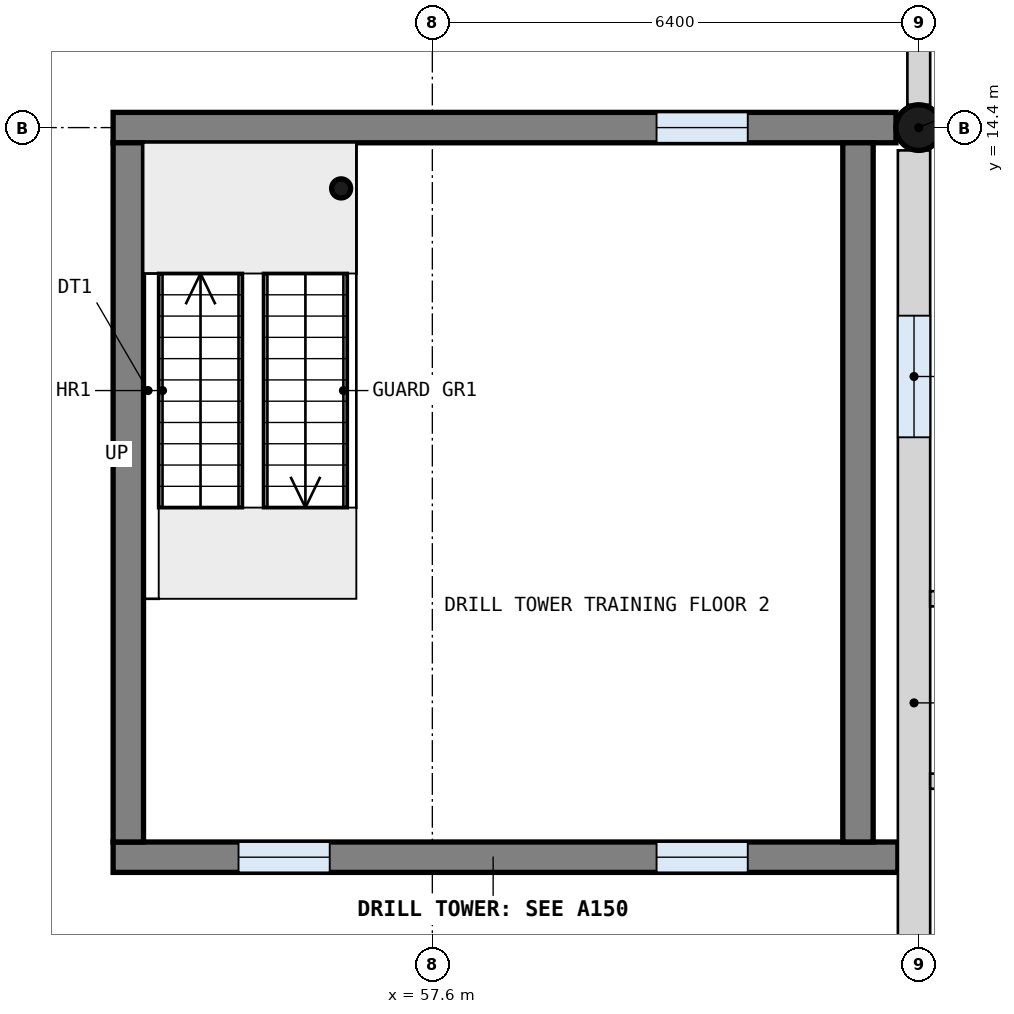
"""IFC4 building model, lengths in metres.
Left out: names, types, materials, properties, quantities, classifications, styles, units other than length and angle.
Written with IfcOpenShell. Run it as: python <this file> out.ifc"""

import sys

from ifc_helpers import new_model, si_unit, direction, frame, frame_2d, origin, origin_2d, place, context, subcontext, project, spatial, rectangle, circle, extrude, element, fill, save


model = new_model("IFC4")
c1 = context("Model", 3, precision=1e-05, world=origin(), true_north=direction((0.0, 1.0)))
c2 = subcontext(c1, "Body", "Model", "MODEL_VIEW")
j1 = project(units=[si_unit("LENGTHUNIT", "METRE"), si_unit("PLANEANGLEUNIT", "RADIAN")], contexts=[c1])
p1 = place(None, origin())
s1 = spatial("IfcSite", under=j1, at=p1, CompositionType="ELEMENT")
p2 = place(p1, origin())
s2 = spatial("IfcBuilding", under=s1, at=p2, CompositionType="ELEMENT")
p3 = place(p2, frame((0.0, 0.0, 4.2)))
s3 = spatial("IfcBuildingStorey", under=s2, at=p3, CompositionType="ELEMENT", Elevation=4.2)
p4 = place(p3, frame((64.0, 14.4, 0.0), z_axis=(0.0, 0.0, 1.0), x_axis=(1.0, 0.0, 0.0)))
e1 = element("IfcColumn", 1, at=p4, inside=s3, PredefinedType="COLUMN", context=c2, shape_type="SweptSolid", body=[
    extrude(circle(Radius=0.3, at=origin_2d()), origin(), (0.0, 0.0, 1.0), 4.2),
])
p5 = place(p3, frame((53.4, 14.4, 0.0), z_axis=(0.0, 0.0, 1.0), x_axis=(1.0, 0.0, 0.0)))
e2 = element("IfcWall", 2, at=p5, inside=s3, PredefinedType="SHEAR", context=c2, shape_type="SweptSolid", body=[
    extrude(rectangle(XDim=10.3, YDim=0.4, at=frame_2d((5.15, 0.0))), origin(), (0.0, 0.0, 1.0), 4.2),
])
p6 = place(p5, frame((7.15, 0.0, 1.1)))
e3 = element("IfcOpeningElement", 3, at=p6, cuts=e2, PredefinedType="OPENING", context=c2, shape_type="SweptSolid", body=[
    extrude(rectangle(XDim=1.2, YDim=1.5, at=frame_2d((0.6, 0.75))), frame((0.0, 0.21, 0.0), z_axis=(0.0, -1.0, 0.0), x_axis=(1.0, 0.0, 0.0)), (0.0, 0.0, 1.0), 0.42),
])
p7 = place(p3, frame((53.4, 4.8, 0.0), z_axis=(0.0, 0.0, 1.0), x_axis=(1.0, 0.0, 0.0)))
e4 = element("IfcWall", 4, at=p7, inside=s3, PredefinedType="SHEAR", context=c2, shape_type="SweptSolid", body=[
    extrude(rectangle(XDim=10.325, YDim=0.4, at=frame_2d((5.163, 0.0))), origin(), (0.0, 0.0, 1.0), 4.2),
])
p8 = place(p7, frame((1.65, 0.0, 1.1)))
e5 = element("IfcOpeningElement", 5, at=p8, cuts=e4, PredefinedType="OPENING", context=c2, shape_type="SweptSolid", body=[
    extrude(rectangle(XDim=1.2, YDim=1.5, at=frame_2d((0.6, 0.75))), frame((0.0, 0.21, 0.0), z_axis=(0.0, -1.0, 0.0), x_axis=(1.0, 0.0, 0.0)), (0.0, 0.0, 1.0), 0.42),
])
p9 = place(p7, frame((7.15, 0.0, 1.1)))
e6 = element("IfcOpeningElement", 6, at=p9, cuts=e4, PredefinedType="OPENING", context=c2, shape_type="SweptSolid", body=[
    extrude(rectangle(XDim=1.2, YDim=1.5, at=frame_2d((0.6, 0.75))), frame((0.0, 0.21, 0.0), z_axis=(0.0, -1.0, 0.0), x_axis=(1.0, 0.0, 0.0)), (0.0, 0.0, 1.0), 0.42),
])
for number, where, z_axis, x_axis in (
    (7, (63.2, 5.0, 0.0), (0.0, 0.0, 1.0), (0.0, 1.0, 0.0)),
    (8, (53.6, 5.0, 0.0), (0.0, 0.0, 1.0), (0.0, 1.0, 0.0)),
):
    element("IfcWall", number, at=place(p3, frame(where, z_axis=z_axis, x_axis=x_axis)), inside=s3, PredefinedType="SHEAR", context=c2, shape_type="SweptSolid", body=[
        extrude(rectangle(XDim=9.2, YDim=0.4, at=frame_2d((4.6, 0.0))), origin(), (0.0, 0.0, 1.0), 4.2),
    ])
p10 = place(p3, frame((63.938, 0.3, 0.0), z_axis=(0.0, 0.0, 1.0), x_axis=(0.0, 1.0, 0.0)))
e9 = element("IfcWall", 9, at=p10, inside=s3, PredefinedType="SOLIDWALL", context=c2, shape_type="SweptSolid", body=[
    extrude(rectangle(XDim=13.8, YDim=0.425, at=frame_2d((6.9, 0.0))), origin(), (0.0, 0.0, 1.0), 2.9),
])
p11 = place(p10, frame((1.425, 0.0, 1.0)))
e10 = element("IfcOpeningElement", 10, at=p11, cuts=e9, PredefinedType="OPENING", context=c2, shape_type="SweptSolid", body=[
    extrude(rectangle(XDim=1.6, YDim=1.8, at=frame_2d((0.8, 0.9))), frame((0.0, 0.222, 0.0), z_axis=(0.0, -1.0, 0.0), x_axis=(1.0, 0.0, 0.0)), (0.0, 0.0, 1.0), 0.445),
])
p12 = place(p10, frame((10.025, 0.0, 1.0)))
e11 = element("IfcOpeningElement", 11, at=p12, cuts=e9, PredefinedType="OPENING", context=c2, shape_type="SweptSolid", body=[
    extrude(rectangle(XDim=1.6, YDim=1.8, at=frame_2d((0.8, 0.9))), frame((0.0, 0.222, 0.0), z_axis=(0.0, -1.0, 0.0), x_axis=(1.0, 0.0, 0.0)), (0.0, 0.0, 1.0), 0.445),
])
p13 = place(p3, frame((64.0, 14.7, 0.0), z_axis=(0.0, 0.0, 1.0), x_axis=(0.0, 1.0, 0.0)))
e12 = element("IfcWall", 12, at=p13, inside=s3, PredefinedType="SOLIDWALL", context=c2, shape_type="SweptSolid", body=[
    extrude(rectangle(XDim=4.5, YDim=0.3, at=frame_2d((2.25, 0.0))), origin(), (0.0, 0.0, 1.0), 2.9),
])
p14 = place(p13, frame((1.45, 0.0, 1.0)))
e13 = element("IfcOpeningElement", 13, at=p14, cuts=e12, PredefinedType="OPENING", context=c2, shape_type="SweptSolid", body=[
    extrude(rectangle(XDim=1.6, YDim=1.8, at=frame_2d((0.8, 0.9))), frame((0.0, 0.16, 0.0), z_axis=(0.0, -1.0, 0.0), x_axis=(1.0, 0.0, 0.0)), (0.0, 0.0, 1.0), 0.32),
])
p15 = place(p3, frame((67.2, 5.8, 0.0), z_axis=(0.0, 0.0, 1.0), x_axis=(-1.0, 0.0, 0.0)))
e14 = element("IfcWall", 14, at=p15, inside=s3, PredefinedType="PARTITIONING", context=c2, shape_type="SweptSolid", body=[
    extrude(rectangle(XDim=3.05, YDim=0.2, at=frame_2d((1.525, 0.0))), origin(), (0.0, 0.0, 1.0), 3.9),
])
p16 = place(p15, frame((1.1, 0.0, 0.0)))
e15 = element("IfcOpeningElement", 15, at=p16, cuts=e14, PredefinedType="OPENING", context=c2, shape_type="SweptSolid", body=[
    extrude(rectangle(XDim=1.0, YDim=2.1, at=frame_2d((0.5, 1.05))), frame((0.0, 0.11, 0.0), z_axis=(0.0, -1.0, 0.0), x_axis=(1.0, 0.0, 0.0)), (0.0, 0.0, 1.0), 0.22),
])
p17 = place(p3, frame((70.1, 8.2, 0.0), z_axis=(0.0, 0.0, 1.0), x_axis=(-1.0, 0.0, 0.0)))
e16 = element("IfcWall", 16, at=p17, inside=s3, PredefinedType="PARTITIONING", context=c2, shape_type="SweptSolid", body=[
    extrude(rectangle(XDim=5.95, YDim=0.2, at=frame_2d((2.975, 0.0))), origin(), (0.0, 0.0, 1.0), 3.9),
])
p18 = place(p3, frame((56.4, 13.6, 0.0), z_axis=(0.0, 0.0, 1.0), x_axis=(1.0, 0.0, 0.0)))
e17 = element("IfcColumn", 17, at=p18, inside=s3, PredefinedType="COLUMN", context=c2, shape_type="SweptSolid", body=[
    extrude(circle(Radius=0.125, at=origin_2d()), origin(), (0.0, 0.0, 1.0), 4.2),
])
p19 = place(p8, origin())
e18 = element("IfcWindow", 18, at=p19, inside=s3, PartitioningType="SINGLE_PANEL", PredefinedType="WINDOW", context=c2, shape_type="SweptSolid", body=[
    extrude(rectangle(XDim=1.2, YDim=1.5, at=frame_2d((0.6, 0.75))), frame((0.0, 0.03, 0.0), z_axis=(0.0, -1.0, 0.0), x_axis=(1.0, 0.0, 0.0)), (0.0, 0.0, 1.0), 0.06),
])
fill(e5, e18)
p20 = place(p9, origin())
e19 = element("IfcWindow", 19, at=p20, inside=s3, PartitioningType="SINGLE_PANEL", PredefinedType="WINDOW", context=c2, shape_type="SweptSolid", body=[
    extrude(rectangle(XDim=1.2, YDim=1.5, at=frame_2d((0.6, 0.75))), frame((0.0, 0.03, 0.0), z_axis=(0.0, -1.0, 0.0), x_axis=(1.0, 0.0, 0.0)), (0.0, 0.0, 1.0), 0.06),
])
fill(e6, e19)
p21 = place(p6, origin())
e20 = element("IfcWindow", 20, at=p21, inside=s3, PartitioningType="SINGLE_PANEL", PredefinedType="WINDOW", context=c2, shape_type="SweptSolid", body=[
    extrude(rectangle(XDim=1.2, YDim=1.5, at=frame_2d((0.6, 0.75))), frame((0.0, 0.03, 0.0), z_axis=(0.0, -1.0, 0.0), x_axis=(1.0, 0.0, 0.0)), (0.0, 0.0, 1.0), 0.06),
])
fill(e3, e20)
p22 = place(p12, origin())
e21 = element("IfcWindow", 21, at=p22, inside=s3, PartitioningType="SINGLE_PANEL", PredefinedType="WINDOW", context=c2, shape_type="SweptSolid", body=[
    extrude(rectangle(XDim=1.6, YDim=1.8, at=frame_2d((0.8, 0.9))), frame((0.0, 0.03, 0.0), z_axis=(0.0, -1.0, 0.0), x_axis=(1.0, 0.0, 0.0)), (0.0, 0.0, 1.0), 0.06),
])
fill(e11, e21)
save(model, sys.argv[1])
